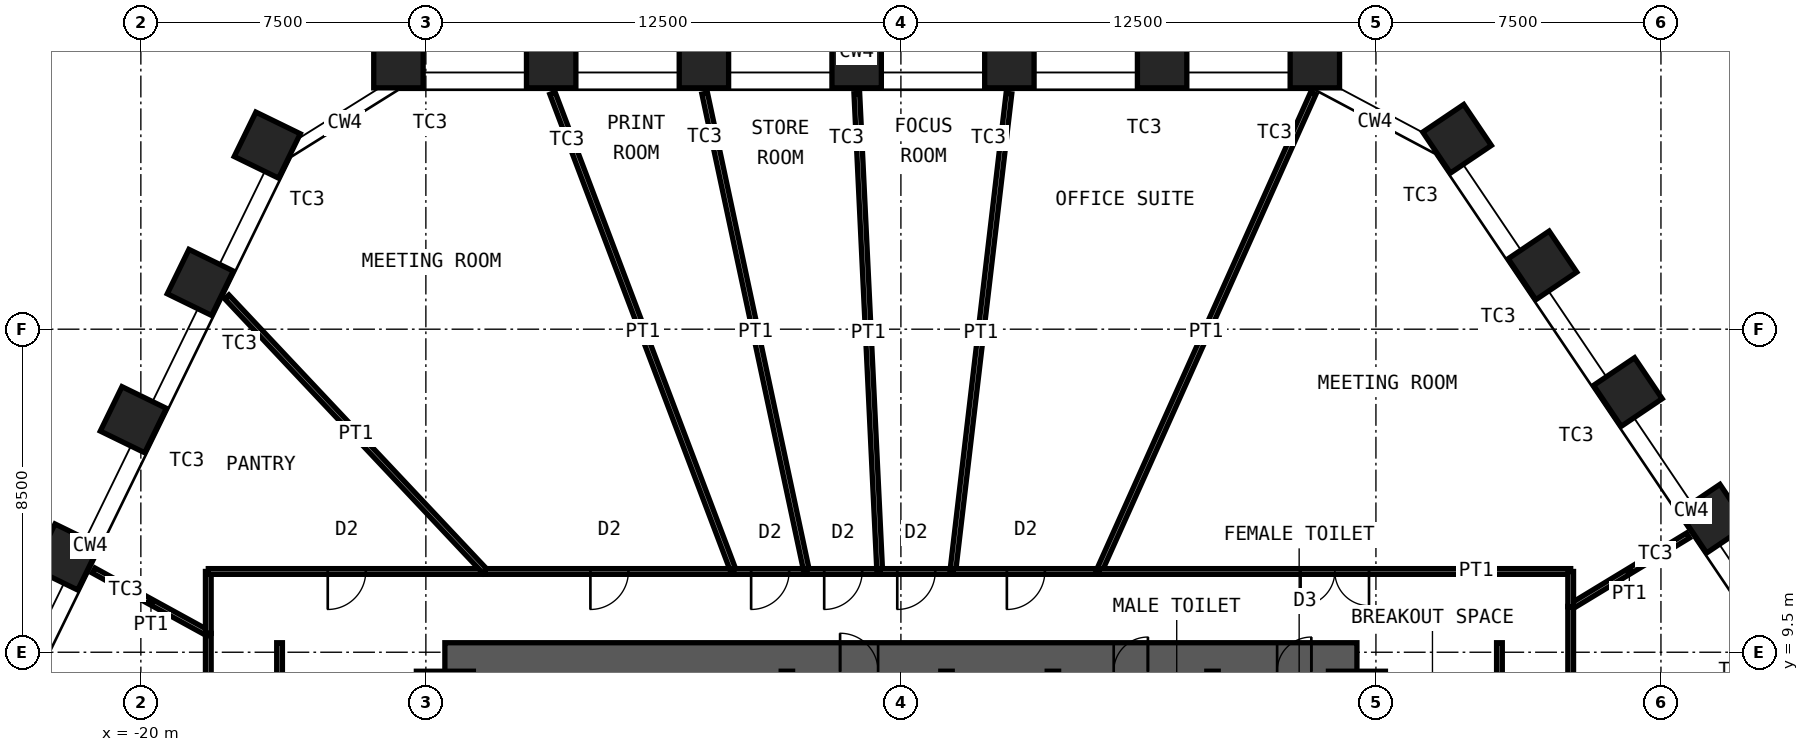
"""IFC4 building model, lengths in metres.
Left out: names, types, materials, properties, quantities, classifications, styles, units other than length and angle.
Written with IfcOpenShell. Run it as: python <this file> out.ifc"""

import sys

from ifc_helpers import new_model, si_unit, direction, frame, frame_2d, origin, origin_2d, place, context, subcontext, project, spatial, rectangle, hollow_rectangle, extrude, element, fill, save


model = new_model("IFC4")
c1 = context("Model", 3, precision=1e-05, world=origin(), true_north=direction((0.0, 1.0)))
c2 = subcontext(c1, "Body", "Model", "MODEL_VIEW")
j1 = project(units=[si_unit("LENGTHUNIT", "METRE"), si_unit("PLANEANGLEUNIT", "RADIAN")], contexts=[c1])
p1 = place(None, origin())
s1 = spatial("IfcSite", under=j1, at=p1, CompositionType="ELEMENT")
p2 = place(p1, origin())
s2 = spatial("IfcBuilding", under=s1, at=p2, CompositionType="ELEMENT")
p3 = place(p2, frame((0.0, 0.0, 136.6)))
s3 = spatial("IfcBuildingStorey", under=s2, at=p3, CompositionType="ELEMENT", Elevation=136.6)
for number, where, z_axis, x_axis in (
    (1, (-13.222, 25.0, 0.0), (0.0, 0.0, 1.0), (-1.0, 0.0, 0.0)),
    (2, (-9.203, 25.0, 0.0), (0.0, 0.0, 1.0), (-1.0, 0.0, 0.0)),
    (3, (-5.184, 25.0, 0.0), (0.0, 0.0, 1.0), (-1.0, 0.0, 0.0)),
    (4, (-1.165, 25.0, 0.0), (0.0, 0.0, 1.0), (-1.0, 0.0, 0.0)),
    (5, (2.854, 25.0, 0.0), (0.0, 0.0, 1.0), (-1.0, 0.0, 0.0)),
    (6, (6.874, 25.0, 0.0), (0.0, 0.0, 1.0), (-1.0, 0.0, 0.0)),
    (7, (10.893, 25.0, 0.0), (0.0, 0.0, 1.0), (-1.0, 0.0, 0.0)),
    (8, (14.635, 23.01, 0.0), (0.0, 0.0, 1.0), (-0.559, 0.829, 0.0)),
    (9, (16.882, 19.678, 0.0), (0.0, 0.0, 1.0), (-0.559, 0.829, 0.0)),
    (10, (19.13, 16.346, 0.0), (0.0, 0.0, 1.0), (-0.559, 0.829, 0.0)),
    (11, (21.377, 13.014, 0.0), (0.0, 0.0, 1.0), (-0.559, 0.829, 0.0)),
    (12, (-21.959, 12.006, 0.0), (0.0, 0.0, 1.0), (-0.438, -0.899, 0.0)),
    (13, (-20.198, 15.618, 0.0), (0.0, 0.0, 1.0), (-0.438, -0.899, 0.0)),
    (14, (-18.436, 19.23, 0.0), (0.0, 0.0, 1.0), (-0.438, -0.899, 0.0)),
    (15, (-16.674, 22.843, 0.0), (0.0, 0.0, 1.0), (-0.438, -0.899, 0.0)),
):
    element("IfcColumn", number, at=place(p3, frame(where, z_axis=z_axis, x_axis=x_axis)), inside=s3, PredefinedType="COLUMN", context=c2, shape_type="SweptSolid", body=[
        extrude(hollow_rectangle(XDim=1.3, YDim=1.3, WallThickness=0.1, at=origin_2d()), origin(), (0.0, 0.0, 1.0), 4.2),
    ])
p4 = place(p3, frame((-12.0, 9.0, 0.0), z_axis=(0.0, 0.0, 1.0), x_axis=(1.0, 0.0, 0.0)))
e16 = element("IfcWall", 16, at=p4, inside=s3, PredefinedType="SHEAR", context=c2, shape_type="SweptSolid", body=[
    extrude(rectangle(XDim=24.0, YDim=1.5, at=frame_2d((12.0, 0.0))), origin(), (0.0, 0.0, 1.0), 4.2),
])
p5 = place(p4, frame((10.4, 0.0, 0.0)))
e17 = element("IfcOpeningElement", 17, at=p5, cuts=e16, PredefinedType="OPENING", context=c2, shape_type="SweptSolid", body=[
    extrude(rectangle(XDim=1.0, YDim=2.1, at=frame_2d((0.5, 1.05))), frame((0.0, 0.76, 0.0), z_axis=(0.0, -1.0, 0.0), x_axis=(1.0, 0.0, 0.0)), (0.0, 0.0, 1.0), 1.52),
])
p6 = place(p4, frame((17.6, 0.0, 0.0)))
e18 = element("IfcOpeningElement", 18, at=p6, cuts=e16, PredefinedType="OPENING", context=c2, shape_type="SweptSolid", body=[
    extrude(rectangle(XDim=0.9, YDim=2.1, at=frame_2d((0.45, 1.05))), frame((0.0, 0.76, 0.0), z_axis=(0.0, -1.0, 0.0), x_axis=(1.0, 0.0, 0.0)), (0.0, 0.0, 1.0), 1.52),
])
p7 = place(p4, frame((21.9, 0.0, 0.0)))
e19 = element("IfcOpeningElement", 19, at=p7, cuts=e16, PredefinedType="OPENING", context=c2, shape_type="SweptSolid", body=[
    extrude(rectangle(XDim=0.9, YDim=2.1, at=frame_2d((0.45, 1.05))), frame((0.0, 0.76, 0.0), z_axis=(0.0, -1.0, 0.0), x_axis=(1.0, 0.0, 0.0)), (0.0, 0.0, 1.0), 1.52),
])
p8 = place(p3, frame((12.0, -9.0, 0.0), z_axis=(0.0, 0.0, 1.0), x_axis=(0.0, 1.0, 0.0)))
e20 = element("IfcWall", 20, at=p8, inside=s3, PredefinedType="SHEAR", context=c2, shape_type="SweptSolid", body=[
    extrude(rectangle(XDim=18.0, YDim=1.5, at=frame_2d((9.0, 0.0))), origin(), (0.0, 0.0, 1.0), 4.2),
])
p9 = place(p8, frame((8.1, 0.0, 0.0)))
e21 = element("IfcOpeningElement", 21, at=p9, cuts=e20, PredefinedType="OPENING", context=c2, shape_type="SweptSolid", body=[
    extrude(rectangle(XDim=1.8, YDim=2.1, at=frame_2d((0.9, 1.05))), frame((0.0, 0.76, 0.0), z_axis=(0.0, -1.0, 0.0), x_axis=(1.0, 0.0, 0.0)), (0.0, 0.0, 1.0), 1.52),
])
p10 = place(p3, frame((-12.0, -9.0, 0.0), z_axis=(0.0, 0.0, 1.0), x_axis=(0.0, 1.0, 0.0)))
e22 = element("IfcWall", 22, at=p10, inside=s3, PredefinedType="SHEAR", context=c2, shape_type="SweptSolid", body=[
    extrude(rectangle(XDim=18.0, YDim=1.5, at=frame_2d((9.0, 0.0))), origin(), (0.0, 0.0, 1.0), 4.2),
])
p11 = place(p10, frame((8.1, 0.0, 0.0)))
e23 = element("IfcOpeningElement", 23, at=p11, cuts=e22, PredefinedType="OPENING", context=c2, shape_type="SweptSolid", body=[
    extrude(rectangle(XDim=1.8, YDim=2.1, at=frame_2d((0.9, 1.05))), frame((0.0, 0.76, 0.0), z_axis=(0.0, -1.0, 0.0), x_axis=(1.0, 0.0, 0.0)), (0.0, 0.0, 1.0), 1.52),
])
p12 = place(p3, frame((-3.0, 5.15, 0.0), z_axis=(0.0, 0.0, 1.0), x_axis=(0.0, 1.0, 0.0)))
e24 = element("IfcWall", 24, at=p12, inside=s3, PredefinedType="PARTITIONING", context=c2, shape_type="SweptSolid", body=[
    extrude(rectangle(XDim=3.85, YDim=0.3, at=frame_2d((1.925, 0.0))), origin(), (0.0, 0.0, 1.0), 3.98),
])
p13 = place(p12, frame((1.425, 0.0, 0.0)))
e25 = element("IfcOpeningElement", 25, at=p13, cuts=e24, PredefinedType="OPENING", context=c2, shape_type="SweptSolid", body=[
    extrude(rectangle(XDim=1.0, YDim=2.1, at=frame_2d((0.5, 1.05))), frame((0.0, 0.16, 0.0), z_axis=(0.0, -1.0, 0.0), x_axis=(1.0, 0.0, 0.0)), (0.0, 0.0, 1.0), 0.32),
])
p14 = place(p3, frame((1.2, 5.15, 0.0), z_axis=(0.0, 0.0, 1.0), x_axis=(0.0, 1.0, 0.0)))
e26 = element("IfcWall", 26, at=p14, inside=s3, PredefinedType="PARTITIONING", context=c2, shape_type="SweptSolid", body=[
    extrude(rectangle(XDim=3.85, YDim=0.3, at=frame_2d((1.925, 0.0))), origin(), (0.0, 0.0, 1.0), 3.98),
])
p15 = place(p14, frame((1.375, 0.0, 0.0)))
e27 = element("IfcOpeningElement", 27, at=p15, cuts=e26, PredefinedType="OPENING", context=c2, shape_type="SweptSolid", body=[
    extrude(rectangle(XDim=1.1, YDim=2.4, at=frame_2d((0.55, 1.2))), frame((0.0, 0.16, 0.0), z_axis=(0.0, -1.0, 0.0), x_axis=(1.0, 0.0, 0.0)), (0.0, 0.0, 1.0), 0.32),
])
for number, where, z_axis, x_axis in (
    (28, (4.0, 5.15, 0.0), (0.0, 0.0, 1.0), (0.0, 1.0, 0.0)),
    (29, (8.2, 5.15, 0.0), (0.0, 0.0, 1.0), (0.0, 1.0, 0.0)),
):
    element("IfcWall", number, at=place(p3, frame(where, z_axis=z_axis, x_axis=x_axis)), inside=s3, PredefinedType="PARTITIONING", context=c2, shape_type="SweptSolid", body=[
        extrude(rectangle(XDim=3.85, YDim=0.3, at=frame_2d((1.925, 0.0))), origin(), (0.0, 0.0, 1.0), 3.98),
    ])
p16 = place(p3, frame((20.711, 12.571, 0.0), z_axis=(0.0, 0.0, 1.0), x_axis=(-0.854862500505, -0.518854608952, 0.0)))
e30 = element("IfcWall", 30, at=p16, inside=s3, PredefinedType="PARTITIONING", context=c2, shape_type="SweptSolid", body=[
    extrude(rectangle(XDim=3.61, YDim=0.15, at=frame_2d((1.805, 0.0))), origin(), (0.0, 0.0, 1.0), 3.33),
])
p17 = place(p3, frame((17.625, 10.698, 0.0), z_axis=(0.0, 0.0, 1.0), x_axis=(0.0, -1.0, 0.0)))
e31 = element("IfcWall", 31, at=p17, inside=s3, PredefinedType="PARTITIONING", context=c2, shape_type="SweptSolid", body=[
    extrude(rectangle(XDim=19.778, YDim=0.15, at=frame_2d((9.889, 0.0))), origin(), (0.0, 0.0, 1.0), 4.03),
])
p18 = place(p17, frame((8.989, 0.0, 0.0)))
e32 = element("IfcOpeningElement", 32, at=p18, cuts=e31, PredefinedType="OPENING", context=c2, shape_type="SweptSolid", body=[
    extrude(rectangle(XDim=1.8, YDim=2.4, at=frame_2d((0.9, 1.2))), frame((0.0, 0.085, 0.0), z_axis=(0.0, -1.0, 0.0), x_axis=(1.0, 0.0, 0.0)), (0.0, 0.0, 1.0), 0.17),
])
p19 = place(p3, frame((-18.225, -1.869, 0.0), z_axis=(0.0, 0.0, 1.0), x_axis=(0.0, 1.0, 0.0)))
e33 = element("IfcWall", 33, at=p19, inside=s3, PredefinedType="PARTITIONING", context=c2, shape_type="SweptSolid", body=[
    extrude(rectangle(XDim=11.865, YDim=0.15, at=frame_2d((5.932, 0.0))), origin(), (0.0, 0.0, 1.0), 4.03),
])
p20 = place(p19, frame((5.032, 0.0, 0.0)))
e34 = element("IfcOpeningElement", 34, at=p20, cuts=e33, PredefinedType="OPENING", context=c2, shape_type="SweptSolid", body=[
    extrude(rectangle(XDim=1.8, YDim=2.4, at=frame_2d((0.9, 1.2))), frame((0.0, 0.085, 0.0), z_axis=(0.0, -1.0, 0.0), x_axis=(1.0, 0.0, 0.0)), (0.0, 0.0, 1.0), 0.17),
])
p21 = place(p3, frame((-21.242, 11.651, 0.0), z_axis=(0.0, 0.0, 1.0), x_axis=(0.876768023831, -0.480913539409, 0.0)))
e35 = element("IfcWall", 35, at=p21, inside=s3, PredefinedType="PARTITIONING", context=c2, shape_type="SweptSolid", body=[
    extrude(rectangle(XDim=3.441, YDim=0.15, at=frame_2d((1.721, 0.0))), origin(), (0.0, 0.0, 1.0), 3.33),
])
p22 = place(p3, frame((-18.225, 9.996, 0.0), z_axis=(0.0, 0.0, 1.0), x_axis=(0.0, 1.0, 0.0)))
e36 = element("IfcWall", 36, at=p22, inside=s3, PredefinedType="PARTITIONING", context=c2, shape_type="SweptSolid", body=[
    extrude(rectangle(XDim=1.629, YDim=0.15, at=frame_2d((0.814, 0.0))), origin(), (0.0, 0.0, 1.0), 4.03),
])
p23 = place(p3, frame((-18.225, 11.625, 0.0), z_axis=(0.0, 0.0, 1.0), x_axis=(1.0, 0.0, 0.0)))
e37 = element("IfcWall", 37, at=p23, inside=s3, PredefinedType="PARTITIONING", context=c2, shape_type="SweptSolid", body=[
    extrude(rectangle(XDim=7.286, YDim=0.15, at=frame_2d((3.643, 0.0))), origin(), (0.0, 0.0, 1.0), 4.03),
])
p24 = place(p23, frame((3.143, 0.0, 0.0)))
e38 = element("IfcOpeningElement", 38, at=p24, cuts=e37, PredefinedType="OPENING", context=c2, shape_type="SweptSolid", body=[
    extrude(rectangle(XDim=1.0, YDim=2.4, at=frame_2d((0.5, 1.2))), frame((0.0, 0.085, 0.0), z_axis=(0.0, -1.0, 0.0), x_axis=(1.0, 0.0, 0.0)), (0.0, 0.0, 1.0), 0.17),
])
p25 = place(p3, frame((-17.738, 18.851, 0.0), z_axis=(0.0, 0.0, 1.0), x_axis=(0.685286406267, -0.728273672039, 0.0)))
e39 = element("IfcWall", 39, at=p25, inside=s3, PredefinedType="PARTITIONING", context=c2, shape_type="SweptSolid", body=[
    extrude(rectangle(XDim=9.922, YDim=0.15, at=frame_2d((4.961, 0.0))), origin(), (0.0, 0.0, 1.0), 3.33),
])
p26 = place(p3, frame((-10.939, 11.625, 0.0), z_axis=(0.0, 0.0, 1.0), x_axis=(1.0, 0.0, 0.0)))
e40 = element("IfcWall", 40, at=p26, inside=s3, PredefinedType="PARTITIONING", context=c2, shape_type="SweptSolid", body=[
    extrude(rectangle(XDim=6.536, YDim=0.15, at=frame_2d((3.268, 0.0))), origin(), (0.0, 0.0, 1.0), 4.03),
])
p27 = place(p26, frame((2.768, 0.0, 0.0)))
e41 = element("IfcOpeningElement", 41, at=p27, cuts=e40, PredefinedType="OPENING", context=c2, shape_type="SweptSolid", body=[
    extrude(rectangle(XDim=1.0, YDim=2.4, at=frame_2d((0.5, 1.2))), frame((0.0, 0.085, 0.0), z_axis=(0.0, -1.0, 0.0), x_axis=(1.0, 0.0, 0.0)), (0.0, 0.0, 1.0), 0.17),
])
p28 = place(p3, frame((-9.167, 24.207, 0.0), z_axis=(0.0, 0.0, 1.0), x_axis=(0.354156368181, -0.935186220427, 0.0)))
e42 = element("IfcWall", 42, at=p28, inside=s3, PredefinedType="PARTITIONING", context=c2, shape_type="SweptSolid", body=[
    extrude(rectangle(XDim=13.454, YDim=0.15, at=frame_2d((6.727, 0.0))), origin(), (0.0, 0.0, 1.0), 3.33),
])
p29 = place(p3, frame((-4.403, 11.625, 0.0), z_axis=(0.0, 0.0, 1.0), x_axis=(1.0, 0.0, 0.0)))
e43 = element("IfcWall", 43, at=p29, inside=s3, PredefinedType="PARTITIONING", context=c2, shape_type="SweptSolid", body=[
    extrude(rectangle(XDim=1.923, YDim=0.15, at=frame_2d((0.961, 0.0))), origin(), (0.0, 0.0, 1.0), 4.03),
])
p30 = place(p29, frame((0.461, 0.0, 0.0)))
e44 = element("IfcOpeningElement", 44, at=p30, cuts=e43, PredefinedType="OPENING", context=c2, shape_type="SweptSolid", body=[
    extrude(rectangle(XDim=1.0, YDim=2.4, at=frame_2d((0.5, 1.2))), frame((0.0, 0.085, 0.0), z_axis=(0.0, -1.0, 0.0), x_axis=(1.0, 0.0, 0.0)), (0.0, 0.0, 1.0), 0.17),
])
p31 = place(p3, frame((-5.163, 24.202, 0.0), z_axis=(0.0, 0.0, 1.0), x_axis=(0.208618861146, -0.977997019819, 0.0)))
e45 = element("IfcWall", 45, at=p31, inside=s3, PredefinedType="PARTITIONING", context=c2, shape_type="SweptSolid", body=[
    extrude(rectangle(XDim=12.86, YDim=0.15, at=frame_2d((6.43, 0.0))), origin(), (0.0, 0.0, 1.0), 3.33),
])
p32 = place(p3, frame((-2.48, 11.625, 0.0), z_axis=(0.0, 0.0, 1.0), x_axis=(1.0, 0.0, 0.0)))
e46 = element("IfcWall", 46, at=p32, inside=s3, PredefinedType="PARTITIONING", context=c2, shape_type="SweptSolid", body=[
    extrude(rectangle(XDim=1.923, YDim=0.15, at=frame_2d((0.961, 0.0))), origin(), (0.0, 0.0, 1.0), 4.03),
])
p33 = place(p32, frame((0.461, 0.0, 0.0)))
e47 = element("IfcOpeningElement", 47, at=p33, cuts=e46, PredefinedType="OPENING", context=c2, shape_type="SweptSolid", body=[
    extrude(rectangle(XDim=1.0, YDim=2.4, at=frame_2d((0.5, 1.2))), frame((0.0, 0.085, 0.0), z_axis=(0.0, -1.0, 0.0), x_axis=(1.0, 0.0, 0.0)), (0.0, 0.0, 1.0), 0.17),
])
p34 = place(p3, frame((-1.16, 24.2, 0.0), z_axis=(0.0, 0.0, 1.0), x_axis=(0.047859979164, -0.998854054602, 0.0)))
e48 = element("IfcWall", 48, at=p34, inside=s3, PredefinedType="PARTITIONING", context=c2, shape_type="SweptSolid", body=[
    extrude(rectangle(XDim=12.59, YDim=0.15, at=frame_2d((6.295, 0.0))), origin(), (0.0, 0.0, 1.0), 3.33),
])
p35 = place(p3, frame((-0.557, 11.625, 0.0), z_axis=(0.0, 0.0, 1.0), x_axis=(1.0, 0.0, 0.0)))
e49 = element("IfcWall", 49, at=p35, inside=s3, PredefinedType="PARTITIONING", context=c2, shape_type="SweptSolid", body=[
    extrude(rectangle(XDim=1.923, YDim=0.15, at=frame_2d((0.961, 0.0))), origin(), (0.0, 0.0, 1.0), 4.03),
])
p36 = place(p35, frame((0.461, 0.0, 0.0)))
e50 = element("IfcOpeningElement", 50, at=p36, cuts=e49, PredefinedType="OPENING", context=c2, shape_type="SweptSolid", body=[
    extrude(rectangle(XDim=1.0, YDim=2.4, at=frame_2d((0.5, 1.2))), frame((0.0, 0.085, 0.0), z_axis=(0.0, -1.0, 0.0), x_axis=(1.0, 0.0, 0.0)), (0.0, 0.0, 1.0), 0.17),
])
p37 = place(p3, frame((2.843, 24.201, 0.0), z_axis=(0.0, 0.0, 1.0), x_axis=(-0.116670084723, -0.993170726175, 0.0)))
e51 = element("IfcWall", 51, at=p37, inside=s3, PredefinedType="PARTITIONING", context=c2, shape_type="SweptSolid", body=[
    extrude(rectangle(XDim=12.662, YDim=0.15, at=frame_2d((6.331, 0.0))), origin(), (0.0, 0.0, 1.0), 3.33),
])
p38 = place(p3, frame((1.366, 11.625, 0.0), z_axis=(0.0, 0.0, 1.0), x_axis=(1.0, 0.0, 0.0)))
e52 = element("IfcWall", 52, at=p38, inside=s3, PredefinedType="PARTITIONING", context=c2, shape_type="SweptSolid", body=[
    extrude(rectangle(XDim=3.845, YDim=0.15, at=frame_2d((1.923, 0.0))), origin(), (0.0, 0.0, 1.0), 4.03),
])
p39 = place(p38, frame((1.423, 0.0, 0.0)))
e53 = element("IfcOpeningElement", 53, at=p39, cuts=e52, PredefinedType="OPENING", context=c2, shape_type="SweptSolid", body=[
    extrude(rectangle(XDim=1.0, YDim=2.4, at=frame_2d((0.5, 1.2))), frame((0.0, 0.085, 0.0), z_axis=(0.0, -1.0, 0.0), x_axis=(1.0, 0.0, 0.0)), (0.0, 0.0, 1.0), 0.17),
])
p40 = place(p3, frame((10.852, 24.209, 0.0), z_axis=(0.0, 0.0, 1.0), x_axis=(-0.40904878746, -0.912512514696, 0.0)))
e54 = element("IfcWall", 54, at=p40, inside=s3, PredefinedType="PARTITIONING", context=c2, shape_type="SweptSolid", body=[
    extrude(rectangle(XDim=13.79, YDim=0.15, at=frame_2d((6.895, 0.0))), origin(), (0.0, 0.0, 1.0), 2.93),
])
p41 = place(p3, frame((5.211, 11.625, 0.0), z_axis=(0.0, 0.0, 1.0), x_axis=(1.0, 0.0, 0.0)))
e55 = element("IfcWall", 55, at=p41, inside=s3, PredefinedType="PARTITIONING", context=c2, shape_type="SweptSolid", body=[
    extrude(rectangle(XDim=12.414, YDim=0.15, at=frame_2d((6.207, 0.0))), origin(), (0.0, 0.0, 1.0), 4.03),
])
p42 = place(p41, frame((5.307, 0.0, 0.0)))
e56 = element("IfcOpeningElement", 56, at=p42, cuts=e55, PredefinedType="OPENING", context=c2, shape_type="SweptSolid", body=[
    extrude(rectangle(XDim=1.8, YDim=2.4, at=frame_2d((0.9, 1.2))), frame((0.0, 0.085, 0.0), z_axis=(0.0, -1.0, 0.0), x_axis=(1.0, 0.0, 0.0)), (0.0, 0.0, 1.0), 0.17),
])
p43 = place(p3, frame((17.625, 11.625, 0.0), z_axis=(0.0, 0.0, 1.0), x_axis=(0.0, -1.0, 0.0)))
e57 = element("IfcWall", 57, at=p43, inside=s3, PredefinedType="PARTITIONING", context=c2, shape_type="SweptSolid", body=[
    extrude(rectangle(XDim=0.927, YDim=0.15, at=frame_2d((0.464, 0.0))), origin(), (0.0, 0.0, 1.0), 4.03),
])
for number, where, z_axis, x_axis in (
    (58, (15.75, 1.9, 0.0), (0.0, 0.0, 1.0), (0.0, 1.0, 0.0)),
    (59, (-16.35, 1.9, 0.0), (0.0, 0.0, 1.0), (0.0, 1.0, 0.0)),
):
    element("IfcWall", number, at=place(p3, frame(where, z_axis=z_axis, x_axis=x_axis)), inside=s3, PredefinedType="PARTITIONING", context=c2, shape_type="SweptSolid", body=[
        extrude(rectangle(XDim=7.85, YDim=0.15, at=frame_2d((3.925, 0.0))), origin(), (0.0, 0.0, 1.0), 4.03),
    ])
p44 = place(p5, origin())
e60 = element("IfcDoor", 60, at=p44, inside=s3, OperationType="SINGLE_SWING_RIGHT", PredefinedType="DOOR", context=c2, shape_type="SweptSolid", body=[
    extrude(rectangle(XDim=1.0, YDim=2.1, at=frame_2d((0.5, 1.05))), frame((0.0, 0.025, 0.0), z_axis=(0.0, -1.0, 0.0), x_axis=(1.0, 0.0, 0.0)), (0.0, 0.0, 1.0), 0.05),
])
fill(e17, e60)
p45 = place(p6, origin())
e61 = element("IfcDoor", 61, at=p45, inside=s3, OperationType="SINGLE_SWING_LEFT", PredefinedType="DOOR", context=c2, shape_type="SweptSolid", body=[
    extrude(rectangle(XDim=0.9, YDim=2.1, at=frame_2d((0.45, 1.05))), frame((0.0, 0.025, 0.0), z_axis=(0.0, -1.0, 0.0), x_axis=(1.0, 0.0, 0.0)), (0.0, 0.0, 1.0), 0.05),
])
fill(e18, e61)
p46 = place(p7, origin())
e62 = element("IfcDoor", 62, at=p46, inside=s3, OperationType="SINGLE_SWING_LEFT", PredefinedType="DOOR", context=c2, shape_type="SweptSolid", body=[
    extrude(rectangle(XDim=0.9, YDim=2.1, at=frame_2d((0.45, 1.05))), frame((0.0, 0.025, 0.0), z_axis=(0.0, -1.0, 0.0), x_axis=(1.0, 0.0, 0.0)), (0.0, 0.0, 1.0), 0.05),
])
fill(e19, e62)
p47 = place(p24, origin())
e63 = element("IfcDoor", 63, at=p47, inside=s3, OperationType="SINGLE_SWING_LEFT", PredefinedType="DOOR", context=c2, shape_type="SweptSolid", body=[
    extrude(rectangle(XDim=1.0, YDim=2.4, at=frame_2d((0.5, 1.2))), frame((0.0, 0.025, 0.0), z_axis=(0.0, -1.0, 0.0), x_axis=(1.0, 0.0, 0.0)), (0.0, 0.0, 1.0), 0.05),
])
fill(e38, e63)
p48 = place(p27, origin())
e64 = element("IfcDoor", 64, at=p48, inside=s3, OperationType="SINGLE_SWING_LEFT", PredefinedType="DOOR", context=c2, shape_type="SweptSolid", body=[
    extrude(rectangle(XDim=1.0, YDim=2.4, at=frame_2d((0.5, 1.2))), frame((0.0, 0.025, 0.0), z_axis=(0.0, -1.0, 0.0), x_axis=(1.0, 0.0, 0.0)), (0.0, 0.0, 1.0), 0.05),
])
fill(e41, e64)
p49 = place(p30, origin())
e65 = element("IfcDoor", 65, at=p49, inside=s3, OperationType="SINGLE_SWING_LEFT", PredefinedType="DOOR", context=c2, shape_type="SweptSolid", body=[
    extrude(rectangle(XDim=1.0, YDim=2.4, at=frame_2d((0.5, 1.2))), frame((0.0, 0.025, 0.0), z_axis=(0.0, -1.0, 0.0), x_axis=(1.0, 0.0, 0.0)), (0.0, 0.0, 1.0), 0.05),
])
fill(e44, e65)
p50 = place(p33, origin())
e66 = element("IfcDoor", 66, at=p50, inside=s3, OperationType="SINGLE_SWING_LEFT", PredefinedType="DOOR", context=c2, shape_type="SweptSolid", body=[
    extrude(rectangle(XDim=1.0, YDim=2.4, at=frame_2d((0.5, 1.2))), frame((0.0, 0.025, 0.0), z_axis=(0.0, -1.0, 0.0), x_axis=(1.0, 0.0, 0.0)), (0.0, 0.0, 1.0), 0.05),
])
fill(e47, e66)
p51 = place(p36, origin())
e67 = element("IfcDoor", 67, at=p51, inside=s3, OperationType="SINGLE_SWING_LEFT", PredefinedType="DOOR", context=c2, shape_type="SweptSolid", body=[
    extrude(rectangle(XDim=1.0, YDim=2.4, at=frame_2d((0.5, 1.2))), frame((0.0, 0.025, 0.0), z_axis=(0.0, -1.0, 0.0), x_axis=(1.0, 0.0, 0.0)), (0.0, 0.0, 1.0), 0.05),
])
fill(e50, e67)
p52 = place(p39, origin())
e68 = element("IfcDoor", 68, at=p52, inside=s3, OperationType="SINGLE_SWING_LEFT", PredefinedType="DOOR", context=c2, shape_type="SweptSolid", body=[
    extrude(rectangle(XDim=1.0, YDim=2.4, at=frame_2d((0.5, 1.2))), frame((0.0, 0.025, 0.0), z_axis=(0.0, -1.0, 0.0), x_axis=(1.0, 0.0, 0.0)), (0.0, 0.0, 1.0), 0.05),
])
fill(e53, e68)
p53 = place(p42, origin())
e69 = element("IfcDoor", 69, at=p53, inside=s3, OperationType="DOUBLE_DOOR_DOUBLE_SWING", PredefinedType="DOOR", context=c2, shape_type="SweptSolid", body=[
    extrude(rectangle(XDim=1.8, YDim=2.4, at=frame_2d((0.9, 1.2))), frame((0.0, 0.025, 0.0), z_axis=(0.0, -1.0, 0.0), x_axis=(1.0, 0.0, 0.0)), (0.0, 0.0, 1.0), 0.05),
])
fill(e56, e69)
save(model, sys.argv[1])
